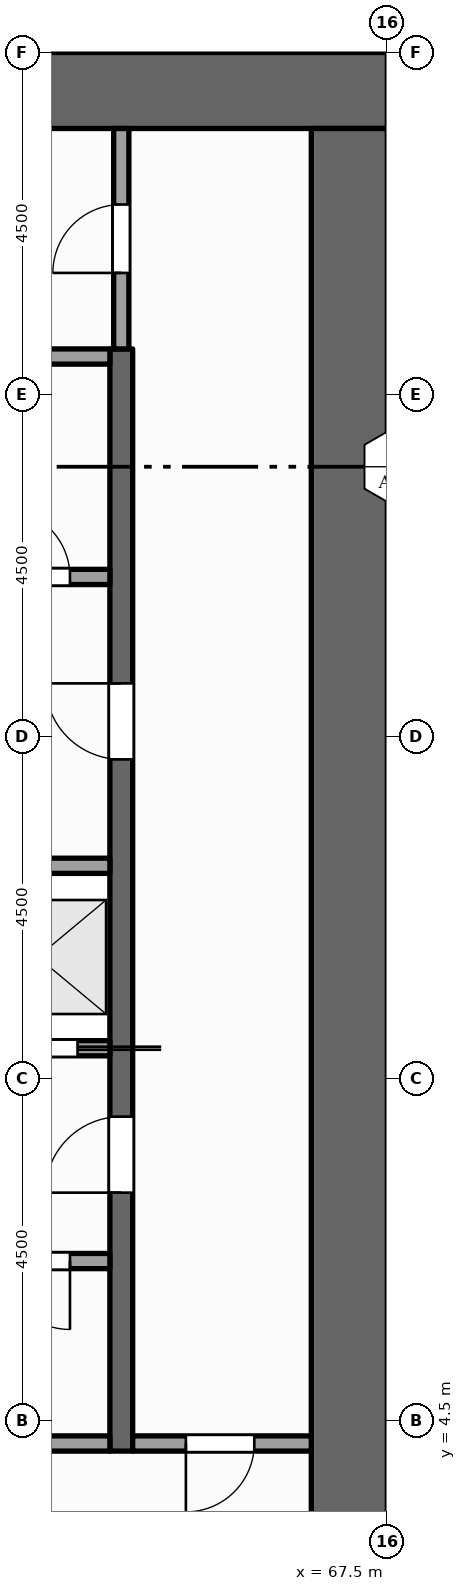
"""IFC4 building model, lengths in metres.
Left out: names, types, materials, properties, quantities, classifications, styles, units other than length and angle.
Written with IfcOpenShell. Run it as: python <this file> out.ifc"""

import sys

from ifc_helpers import new_model, si_unit, direction, frame, frame_2d, origin, place, context, subcontext, project, spatial, rectangle, extrude, element, fill, save


model = new_model("IFC4")
c1 = context("Model", 3, precision=1e-05, world=origin(), true_north=direction((0.0, 1.0)))
c2 = subcontext(c1, "Body", "Model", "MODEL_VIEW")
j1 = project(units=[si_unit("LENGTHUNIT", "METRE"), si_unit("PLANEANGLEUNIT", "RADIAN")], contexts=[c1])
p1 = place(None, origin())
s1 = spatial("IfcSite", under=j1, at=p1, CompositionType="ELEMENT")
p2 = place(p1, origin())
s2 = spatial("IfcBuilding", under=s1, at=p2, CompositionType="ELEMENT")
p3 = place(p2, frame((0.0, 0.0, 183.0)))
s3 = spatial("IfcBuildingStorey", under=s2, at=p3, CompositionType="ELEMENT", Elevation=183.0)
p4 = place(p3, frame((54.0, 22.0, -0.15), z_axis=(0.0, 0.0, 1.0), x_axis=(1.0, 0.0, 0.0)))
e1 = element("IfcWall", 1, at=p4, inside=s3, PredefinedType="SHEAR", context=c2, shape_type="SweptSolid", body=[
    extrude(rectangle(XDim=13.5, YDim=1.0, at=frame_2d((6.75, 0.0))), origin(), (0.0, 0.0, 1.0), 4.0),
])
p5 = place(p3, frame((67.0, 1.0, -0.15), z_axis=(0.0, 0.0, 1.0), x_axis=(0.0, 1.0, 0.0)))
e2 = element("IfcWall", 2, at=p5, inside=s3, PredefinedType="SHEAR", context=c2, shape_type="SweptSolid", body=[
    extrude(rectangle(XDim=20.5, YDim=1.0, at=frame_2d((10.25, 0.0))), origin(), (0.0, 0.0, 1.0), 4.0),
])
p6 = place(p3, frame((64.0, 4.1, 0.0), z_axis=(0.0, 0.0, 1.0), x_axis=(0.0, 1.0, 0.0)))
e3 = element("IfcWall", 3, at=p6, inside=s3, PredefinedType="SHEAR", context=c2, shape_type="SweptSolid", body=[
    extrude(rectangle(XDim=14.5, YDim=0.3, at=frame_2d((7.25, 0.0))), origin(), (0.0, 0.0, 1.0), 3.75),
])
p7 = place(p6, frame((3.4, 0.0, 0.0)))
e4 = element("IfcOpeningElement", 4, at=p7, cuts=e3, PredefinedType="OPENING", context=c2, shape_type="SweptSolid", body=[
    extrude(rectangle(XDim=1.0, YDim=2.1, at=frame_2d((0.5, 1.05))), frame((0.0, 0.16, 0.0), z_axis=(0.0, -1.0, 0.0), x_axis=(1.0, 0.0, 0.0)), (0.0, 0.0, 1.0), 0.32),
])
p8 = place(p6, frame((9.1, 0.0, 0.0)))
e5 = element("IfcOpeningElement", 5, at=p8, cuts=e3, PredefinedType="OPENING", context=c2, shape_type="SweptSolid", body=[
    extrude(rectangle(XDim=1.0, YDim=2.1, at=frame_2d((0.5, 1.05))), frame((0.0, 0.16, 0.0), z_axis=(0.0, -1.0, 0.0), x_axis=(1.0, 0.0, 0.0)), (0.0, 0.0, 1.0), 0.32),
])
p9 = place(p3, frame((64.0, 18.6, 0.0), z_axis=(0.0, 0.0, 1.0), x_axis=(0.0, 1.0, 0.0)))
e6 = element("IfcWall", 6, at=p9, inside=s3, PredefinedType="PARTITIONING", context=c2, shape_type="SweptSolid", body=[
    extrude(rectangle(XDim=2.9, YDim=0.2, at=frame_2d((1.45, 0.0))), origin(), (0.0, 0.0, 1.0), 3.75),
])
p10 = place(p9, frame((1.0, 0.0, 0.0)))
e7 = element("IfcOpeningElement", 7, at=p10, cuts=e6, PredefinedType="OPENING", context=c2, shape_type="SweptSolid", body=[
    extrude(rectangle(XDim=0.9, YDim=2.1, at=frame_2d((0.45, 1.05))), frame((0.0, 0.11, 0.0), z_axis=(0.0, -1.0, 0.0), x_axis=(1.0, 0.0, 0.0)), (0.0, 0.0, 1.0), 0.22),
])
p11 = place(p3, frame((61.9, 4.2, 0.0), z_axis=(0.0, 0.0, 1.0), x_axis=(1.0, 0.0, 0.0)))
e8 = element("IfcWall", 8, at=p11, inside=s3, PredefinedType="PARTITIONING", context=c2, shape_type="SweptSolid", body=[
    extrude(rectangle(XDim=1.95, YDim=0.2, at=frame_2d((0.975, 0.0))), origin(), (0.0, 0.0, 1.0), 3.75),
])
p12 = place(p3, frame((64.15, 4.2, 0.0), z_axis=(0.0, 0.0, 1.0), x_axis=(1.0, 0.0, 0.0)))
e9 = element("IfcWall", 9, at=p12, inside=s3, PredefinedType="PARTITIONING", context=c2, shape_type="SweptSolid", body=[
    extrude(rectangle(XDim=2.35, YDim=0.2, at=frame_2d((1.175, 0.0))), origin(), (0.0, 0.0, 1.0), 3.75),
])
p13 = place(p12, frame((0.7, 0.0, 0.0)))
e10 = element("IfcOpeningElement", 10, at=p13, cuts=e9, PredefinedType="OPENING", context=c2, shape_type="SweptSolid", body=[
    extrude(rectangle(XDim=0.9, YDim=2.1, at=frame_2d((0.45, 1.05))), frame((0.0, 0.11, 0.0), z_axis=(0.0, -1.0, 0.0), x_axis=(1.0, 0.0, 0.0)), (0.0, 0.0, 1.0), 0.22),
])
p14 = place(p3, frame((61.9, 6.6, 0.0), z_axis=(0.0, 0.0, 1.0), x_axis=(1.0, 0.0, 0.0)))
e11 = element("IfcWall", 11, at=p14, inside=s3, PredefinedType="PARTITIONING", context=c2, shape_type="SweptSolid", body=[
    extrude(rectangle(XDim=1.95, YDim=0.2, at=frame_2d((0.975, 0.0))), origin(), (0.0, 0.0, 1.0), 3.75),
])
p15 = place(p14, frame((0.525, 0.0, 0.0)))
e12 = element("IfcOpeningElement", 12, at=p15, cuts=e11, PredefinedType="OPENING", context=c2, shape_type="SweptSolid", body=[
    extrude(rectangle(XDim=0.9, YDim=2.1, at=frame_2d((0.45, 1.05))), frame((0.0, 0.11, 0.0), z_axis=(0.0, -1.0, 0.0), x_axis=(1.0, 0.0, 0.0)), (0.0, 0.0, 1.0), 0.22),
])
p16 = place(p3, frame((61.9, 9.4, 0.0), z_axis=(0.0, 0.0, 1.0), x_axis=(1.0, 0.0, 0.0)))
e13 = element("IfcWall", 13, at=p16, inside=s3, PredefinedType="SOLIDWALL", context=c2, shape_type="SweptSolid", body=[
    extrude(rectangle(XDim=1.95, YDim=0.2, at=frame_2d((0.975, 0.0))), origin(), (0.0, 0.0, 1.0), 3.75),
])
p17 = place(p16, frame((0.425, 0.0, 0.012)))
e14 = element("IfcOpeningElement", 14, at=p17, cuts=e13, PredefinedType="OPENING", context=c2, shape_type="SweptSolid", body=[
    extrude(rectangle(XDim=1.1, YDim=2.1, at=frame_2d((0.55, 1.05))), frame((0.0, 0.11, 0.0), z_axis=(0.0, -1.0, 0.0), x_axis=(1.0, 0.0, 0.0)), (0.0, 0.0, 1.0), 0.22),
])
p18 = place(p3, frame((61.9, 11.8, 0.0), z_axis=(0.0, 0.0, 1.0), x_axis=(1.0, 0.0, 0.0)))
e15 = element("IfcWall", 15, at=p18, inside=s3, PredefinedType="SOLIDWALL", context=c2, shape_type="SweptSolid", body=[
    extrude(rectangle(XDim=1.95, YDim=0.2, at=frame_2d((0.975, 0.0))), origin(), (0.0, 0.0, 1.0), 3.75),
])
p19 = place(p3, frame((61.9, 15.6, 0.0), z_axis=(0.0, 0.0, 1.0), x_axis=(1.0, 0.0, 0.0)))
e16 = element("IfcWall", 16, at=p19, inside=s3, PredefinedType="PARTITIONING", context=c2, shape_type="SweptSolid", body=[
    extrude(rectangle(XDim=1.95, YDim=0.2, at=frame_2d((0.975, 0.0))), origin(), (0.0, 0.0, 1.0), 3.75),
])
p20 = place(p19, frame((0.525, 0.0, 0.0)))
e17 = element("IfcOpeningElement", 17, at=p20, cuts=e16, PredefinedType="OPENING", context=c2, shape_type="SweptSolid", body=[
    extrude(rectangle(XDim=0.9, YDim=2.1, at=frame_2d((0.45, 1.05))), frame((0.0, 0.11, 0.0), z_axis=(0.0, -1.0, 0.0), x_axis=(1.0, 0.0, 0.0)), (0.0, 0.0, 1.0), 0.22),
])
p21 = place(p3, frame((61.9, 18.5, 0.0), z_axis=(0.0, 0.0, 1.0), x_axis=(1.0, 0.0, 0.0)))
e18 = element("IfcWall", 18, at=p21, inside=s3, PredefinedType="PARTITIONING", context=c2, shape_type="SweptSolid", body=[
    extrude(rectangle(XDim=1.95, YDim=0.2, at=frame_2d((0.975, 0.0))), origin(), (0.0, 0.0, 1.0), 3.75),
])
p22 = place(p17, origin())
e19 = element("IfcDoor", 19, at=p22, inside=s3, OperationType="SLIDING_TO_RIGHT", PredefinedType="DOOR", context=c2, shape_type="SweptSolid", body=[
    extrude(rectangle(XDim=1.1, YDim=2.1, at=frame_2d((0.55, 1.05))), frame((0.0, 0.025, 0.0), z_axis=(0.0, -1.0, 0.0), x_axis=(1.0, 0.0, 0.0)), (0.0, 0.0, 1.0), 0.05),
])
fill(e14, e19)
p23 = place(p7, origin())
e20 = element("IfcDoor", 20, at=p23, inside=s3, OperationType="SINGLE_SWING_LEFT", PredefinedType="DOOR", context=c2, shape_type="SweptSolid", body=[
    extrude(rectangle(XDim=1.0, YDim=2.1, at=frame_2d((0.5, 1.05))), frame((0.0, 0.025, 0.0), z_axis=(0.0, -1.0, 0.0), x_axis=(1.0, 0.0, 0.0)), (0.0, 0.0, 1.0), 0.05),
])
fill(e4, e20)
p24 = place(p8, origin())
e21 = element("IfcDoor", 21, at=p24, inside=s3, OperationType="SINGLE_SWING_RIGHT", PredefinedType="DOOR", context=c2, shape_type="SweptSolid", body=[
    extrude(rectangle(XDim=1.0, YDim=2.1, at=frame_2d((0.5, 1.05))), frame((0.0, 0.025, 0.0), z_axis=(0.0, -1.0, 0.0), x_axis=(1.0, 0.0, 0.0)), (0.0, 0.0, 1.0), 0.05),
])
fill(e5, e21)
p25 = place(p13, origin())
e22 = element("IfcDoor", 22, at=p25, inside=s3, OperationType="SINGLE_SWING_LEFT", PredefinedType="DOOR", context=c2, shape_type="SweptSolid", body=[
    extrude(rectangle(XDim=0.9, YDim=2.1, at=frame_2d((0.45, 1.05))), frame((0.0, 0.025, 0.0), z_axis=(0.0, -1.0, 0.0), x_axis=(1.0, 0.0, 0.0)), (0.0, 0.0, 1.0), 0.05),
])
fill(e10, e22)
p26 = place(p10, origin())
e23 = element("IfcDoor", 23, at=p26, inside=s3, OperationType="SINGLE_SWING_LEFT", PredefinedType="DOOR", context=c2, shape_type="SweptSolid", body=[
    extrude(rectangle(XDim=0.9, YDim=2.1, at=frame_2d((0.45, 1.05))), frame((0.0, 0.025, 0.0), z_axis=(0.0, -1.0, 0.0), x_axis=(1.0, 0.0, 0.0)), (0.0, 0.0, 1.0), 0.05),
])
fill(e7, e23)
p27 = place(p15, origin())
e24 = element("IfcDoor", 24, at=p27, inside=s3, OperationType="SINGLE_SWING_RIGHT", PredefinedType="DOOR", context=c2, shape_type="SweptSolid", body=[
    extrude(rectangle(XDim=0.9, YDim=2.1, at=frame_2d((0.45, 1.05))), frame((0.0, 0.025, 0.0), z_axis=(0.0, -1.0, 0.0), x_axis=(1.0, 0.0, 0.0)), (0.0, 0.0, 1.0), 0.05),
])
fill(e12, e24)
p28 = place(p20, origin())
e25 = element("IfcDoor", 25, at=p28, inside=s3, OperationType="SINGLE_SWING_LEFT", PredefinedType="DOOR", context=c2, shape_type="SweptSolid", body=[
    extrude(rectangle(XDim=0.9, YDim=2.1, at=frame_2d((0.45, 1.05))), frame((0.0, 0.025, 0.0), z_axis=(0.0, -1.0, 0.0), x_axis=(1.0, 0.0, 0.0)), (0.0, 0.0, 1.0), 0.05),
])
fill(e17, e25)
save(model, sys.argv[1])
